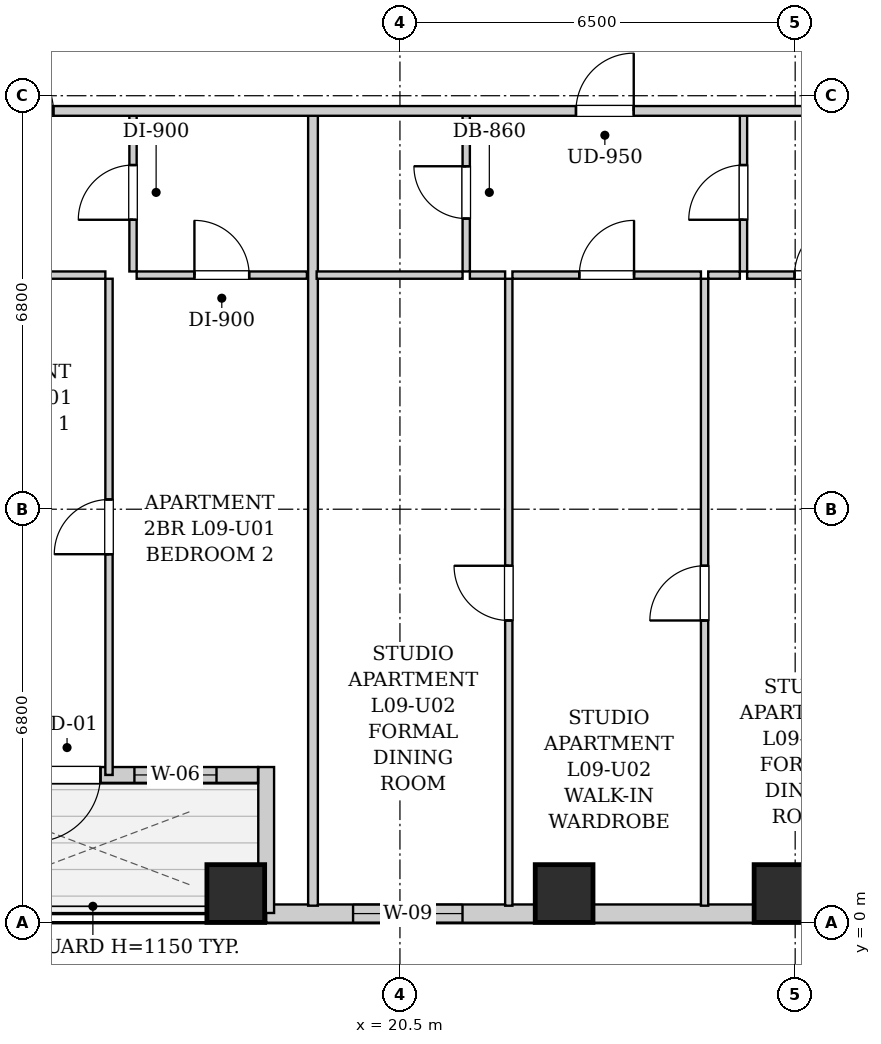
"""IFC4 building model, lengths in metres.
Left out: names, types, materials, properties, quantities, classifications, styles, units other than length and angle.
Written with IfcOpenShell. Run it as: python <this file> out.ifc"""

import sys

from ifc_helpers import new_model, si_unit, direction, frame, frame_2d, origin, origin_2d, place, context, subcontext, project, spatial, rectangle, extrude, element, fill, save


model = new_model("IFC4")
c1 = context("Model", 3, precision=1e-05, world=origin(), true_north=direction((0.0, 1.0)))
c2 = subcontext(c1, "Body", "Model", "MODEL_VIEW")
j1 = project(units=[si_unit("LENGTHUNIT", "METRE"), si_unit("PLANEANGLEUNIT", "RADIAN")], contexts=[c1])
p1 = place(None, origin())
s1 = spatial("IfcSite", under=j1, at=p1, CompositionType="ELEMENT")
p2 = place(p1, origin())
s2 = spatial("IfcBuilding", under=s1, at=p2, CompositionType="ELEMENT")
p3 = place(p2, frame((0.0, 0.0, 38.6)))
s3 = spatial("IfcBuildingStorey", under=s2, at=p3, CompositionType="ELEMENT", Elevation=38.6)
for number, where, z_axis, x_axis in (
    (1, (17.8, 0.48, 0.0), (0.0, 0.0, 1.0), (1.0, 0.0, 0.0)),
    (2, (23.2, 0.48, 0.0), (0.0, 0.0, 1.0), (1.0, 0.0, 0.0)),
    (3, (26.8, 0.48, 0.0), (0.0, 0.0, 1.0), (1.0, 0.0, 0.0)),
):
    element("IfcColumn", number, at=place(p3, frame(where, z_axis=z_axis, x_axis=x_axis)), inside=s3, PredefinedType="COLUMN", context=c2, shape_type="SweptSolid", body=[
        extrude(rectangle(XDim=0.95, YDim=0.95, at=origin_2d()), origin(), (0.0, 0.0, 1.0), 3.2),
    ])
p4 = place(p3, frame((44.0, 0.15, 0.0), z_axis=(0.0, 0.0, 1.0), x_axis=(-1.0, 0.0, 0.0)))
e4 = element("IfcWall", 4, at=p4, inside=s3, PredefinedType="SOLIDWALL", context=c2, shape_type="SweptSolid", body=[
    extrude(rectangle(XDim=25.7, YDim=0.3, at=frame_2d((12.85, 0.0))), origin(), (0.0, 0.0, 1.0), 1.975),
])
p5 = place(p4, frame((22.471, 0.0, 0.55)))
e5 = element("IfcOpeningElement", 5, at=p5, cuts=e4, PredefinedType="OPENING", context=c2, shape_type="SweptSolid", body=[
    extrude(rectangle(XDim=1.8, YDim=1.2, at=frame_2d((0.9, 0.6))), frame((0.0, 0.16, 0.0), z_axis=(0.0, -1.0, 0.0), x_axis=(1.0, 0.0, 0.0)), (0.0, 0.0, 1.0), 0.32),
])
p6 = place(p4, frame((15.65, 0.0, 0.55)))
e6 = element("IfcOpeningElement", 6, at=p6, cuts=e4, PredefinedType="OPENING", context=c2, shape_type="SweptSolid", body=[
    extrude(rectangle(XDim=0.85, YDim=1.2, at=frame_2d((0.425, 0.6))), frame((0.0, 0.16, 0.0), z_axis=(0.0, -1.0, 0.0), x_axis=(1.0, 0.0, 0.0)), (0.0, 0.0, 1.0), 0.32),
])
p7 = place(p4, frame((12.777, 0.0, 0.55)))
e7 = element("IfcOpeningElement", 7, at=p7, cuts=e4, PredefinedType="OPENING", context=c2, shape_type="SweptSolid", body=[
    extrude(rectangle(XDim=1.8, YDim=1.2, at=frame_2d((0.9, 0.6))), frame((0.0, 0.16, 0.0), z_axis=(0.0, -1.0, 0.0), x_axis=(1.0, 0.0, 0.0)), (0.0, 0.0, 1.0), 0.32),
])
p8 = place(p4, frame((9.315, 0.0, 0.55)))
e8 = element("IfcOpeningElement", 8, at=p8, cuts=e4, PredefinedType="OPENING", context=c2, shape_type="SweptSolid", body=[
    extrude(rectangle(XDim=0.85, YDim=1.2, at=frame_2d((0.425, 0.6))), frame((0.0, 0.16, 0.0), z_axis=(0.0, -1.0, 0.0), x_axis=(1.0, 0.0, 0.0)), (0.0, 0.0, 1.0), 0.32),
])
p9 = place(p4, frame((6.435, 0.0, 0.55)))
e9 = element("IfcOpeningElement", 9, at=p9, cuts=e4, PredefinedType="OPENING", context=c2, shape_type="SweptSolid", body=[
    extrude(rectangle(XDim=1.8, YDim=1.2, at=frame_2d((0.9, 0.6))), frame((0.0, 0.16, 0.0), z_axis=(0.0, -1.0, 0.0), x_axis=(1.0, 0.0, 0.0)), (0.0, 0.0, 1.0), 0.32),
])
p10 = place(p4, frame((2.106, 0.0, 0.55)))
e10 = element("IfcOpeningElement", 10, at=p10, cuts=e4, PredefinedType="OPENING", context=c2, shape_type="SweptSolid", body=[
    extrude(rectangle(XDim=1.8, YDim=1.2, at=frame_2d((0.9, 0.6))), frame((0.0, 0.16, 0.0), z_axis=(0.0, -1.0, 0.0), x_axis=(1.0, 0.0, 0.0)), (0.0, 0.0, 1.0), 0.32),
])
p11 = place(p3, frame((18.3, 0.16, 0.0), z_axis=(0.0, 0.0, 1.0), x_axis=(0.0, 1.0, 0.0)))
e11 = element("IfcWall", 11, at=p11, inside=s3, PredefinedType="SOLIDWALL", context=c2, shape_type="SweptSolid", body=[
    extrude(rectangle(XDim=2.4, YDim=0.26, at=frame_2d((1.2, 0.0))), origin(), (0.0, 0.0, 1.0), 2.94),
])
p12 = place(p3, frame((18.166, 2.43, 0.0), z_axis=(0.0, 0.0, 1.0), x_axis=(-1.0, 0.0, 0.0)))
e12 = element("IfcWall", 12, at=p12, inside=s3, PredefinedType="SOLIDWALL", context=c2, shape_type="SweptSolid", body=[
    extrude(rectangle(XDim=5.432, YDim=0.26, at=frame_2d((2.716, 0.0))), origin(), (0.0, 0.0, 1.0), 2.94),
])
p13 = place(p12, frame((2.591, 0.0, 0.0)))
e13 = element("IfcOpeningElement", 13, at=p13, cuts=e12, PredefinedType="OPENING", context=c2, shape_type="SweptSolid", body=[
    extrude(rectangle(XDim=1.1, YDim=2.0, at=frame_2d((0.55, 1.0))), frame((0.0, 0.14, 0.0), z_axis=(0.0, -1.0, 0.0), x_axis=(1.0, 0.0, 0.0)), (0.0, 0.0, 1.0), 0.28),
])
p14 = place(p12, frame((3.851, 0.0, 0.55)))
e14 = element("IfcOpeningElement", 14, at=p14, cuts=e12, PredefinedType="OPENING", context=c2, shape_type="SweptSolid", body=[
    extrude(rectangle(XDim=0.85, YDim=1.2, at=frame_2d((0.425, 0.6))), frame((0.0, 0.14, 0.0), z_axis=(0.0, -1.0, 0.0), x_axis=(1.0, 0.0, 0.0)), (0.0, 0.0, 1.0), 0.28),
])
p15 = place(p12, frame((0.683, 0.0, 0.85)))
e15 = element("IfcOpeningElement", 15, at=p15, cuts=e12, PredefinedType="OPENING", context=c2, shape_type="SweptSolid", body=[
    extrude(rectangle(XDim=1.35, YDim=1.65, at=frame_2d((0.675, 0.825))), frame((0.0, 0.14, 0.0), z_axis=(0.0, -1.0, 0.0), x_axis=(1.0, 0.0, 0.0)), (0.0, 0.0, 1.0), 0.28),
])
p16 = place(p3, frame((16.11, 10.71, 0.0), z_axis=(0.0, 0.0, 1.0), x_axis=(0.0, 1.0, 0.0)))
e16 = element("IfcWall", 16, at=p16, inside=s3, PredefinedType="PARTITIONING", context=c2, shape_type="SweptSolid", body=[
    extrude(rectangle(XDim=2.6, YDim=0.12, at=frame_2d((1.3, 0.0))), origin(), (0.0, 0.0, 1.0), 2.94),
])
p17 = place(p16, frame((0.85, 0.0, 0.0)))
e17 = element("IfcOpeningElement", 17, at=p17, cuts=e16, PredefinedType="OPENING", context=c2, shape_type="SweptSolid", body=[
    extrude(rectangle(XDim=0.9, YDim=2.05, at=frame_2d((0.45, 1.025))), frame((0.0, 0.07, 0.0), z_axis=(0.0, -1.0, 0.0), x_axis=(1.0, 0.0, 0.0)), (0.0, 0.0, 1.0), 0.14),
])
p18 = place(p3, frame((12.6, 10.65, 0.0), z_axis=(0.0, 0.0, 1.0), x_axis=(1.0, 0.0, 0.0)))
e18 = element("IfcWall", 18, at=p18, inside=s3, PredefinedType="PARTITIONING", context=c2, shape_type="SweptSolid", body=[
    extrude(rectangle(XDim=3.055, YDim=0.12, at=frame_2d((1.527, 0.0))), origin(), (0.0, 0.0, 1.0), 2.94),
])
p19 = place(p18, frame((1.077, 0.0, 0.0)))
e19 = element("IfcOpeningElement", 19, at=p19, cuts=e18, PredefinedType="OPENING", context=c2, shape_type="SweptSolid", body=[
    extrude(rectangle(XDim=0.9, YDim=2.05, at=frame_2d((0.45, 1.025))), frame((0.0, 0.07, 0.0), z_axis=(0.0, -1.0, 0.0), x_axis=(1.0, 0.0, 0.0)), (0.0, 0.0, 1.0), 0.14),
])
p20 = place(p3, frame((16.17, 10.65, 0.0), z_axis=(0.0, 0.0, 1.0), x_axis=(1.0, 0.0, 0.0)))
e20 = element("IfcWall", 20, at=p20, inside=s3, PredefinedType="PARTITIONING", context=c2, shape_type="SweptSolid", body=[
    extrude(rectangle(XDim=2.8, YDim=0.12, at=frame_2d((1.4, 0.0))), origin(), (0.0, 0.0, 1.0), 2.94),
])
p21 = place(p20, frame((0.95, 0.0, 0.0)))
e21 = element("IfcOpeningElement", 21, at=p21, cuts=e20, PredefinedType="OPENING", context=c2, shape_type="SweptSolid", body=[
    extrude(rectangle(XDim=0.9, YDim=2.05, at=frame_2d((0.45, 1.025))), frame((0.0, 0.07, 0.0), z_axis=(0.0, -1.0, 0.0), x_axis=(1.0, 0.0, 0.0)), (0.0, 0.0, 1.0), 0.14),
])
p22 = place(p3, frame((15.715, 2.43, 0.0), z_axis=(0.0, 0.0, 1.0), x_axis=(0.0, 1.0, 0.0)))
e22 = element("IfcWall", 22, at=p22, inside=s3, PredefinedType="PARTITIONING", context=c2, shape_type="SweptSolid", body=[
    extrude(rectangle(XDim=8.16, YDim=0.12, at=frame_2d((4.08, 0.0))), origin(), (0.0, 0.0, 1.0), 2.94),
])
p23 = place(p22, frame((3.63, 0.0, 0.0)))
e23 = element("IfcOpeningElement", 23, at=p23, cuts=e22, PredefinedType="OPENING", context=c2, shape_type="SweptSolid", body=[
    extrude(rectangle(XDim=0.9, YDim=2.05, at=frame_2d((0.45, 1.025))), frame((0.0, 0.07, 0.0), z_axis=(0.0, -1.0, 0.0), x_axis=(1.0, 0.0, 0.0)), (0.0, 0.0, 1.0), 0.14),
])
p24 = place(p3, frame((19.07, 0.28, 0.0), z_axis=(0.0, 0.0, 1.0), x_axis=(0.0, 1.0, 0.0)))
e24 = element("IfcWall", 24, at=p24, inside=s3, PredefinedType="PARTITIONING", context=c2, shape_type="SweptSolid", body=[
    extrude(rectangle(XDim=13.03, YDim=0.16, at=frame_2d((6.515, 0.0))), origin(), (0.0, 0.0, 1.0), 2.94),
])
p25 = place(p3, frame((21.59, 10.71, 0.0), z_axis=(0.0, 0.0, 1.0), x_axis=(0.0, 1.0, 0.0)))
e25 = element("IfcWall", 25, at=p25, inside=s3, PredefinedType="PARTITIONING", context=c2, shape_type="SweptSolid", body=[
    extrude(rectangle(XDim=2.6, YDim=0.12, at=frame_2d((1.3, 0.0))), origin(), (0.0, 0.0, 1.0), 2.94),
])
p26 = place(p25, frame((0.87, 0.0, 0.0)))
e26 = element("IfcOpeningElement", 26, at=p26, cuts=e25, PredefinedType="OPENING", context=c2, shape_type="SweptSolid", body=[
    extrude(rectangle(XDim=0.86, YDim=2.05, at=frame_2d((0.43, 1.025))), frame((0.0, 0.07, 0.0), z_axis=(0.0, -1.0, 0.0), x_axis=(1.0, 0.0, 0.0)), (0.0, 0.0, 1.0), 0.14),
])
p27 = place(p3, frame((19.13, 10.65, 0.0), z_axis=(0.0, 0.0, 1.0), x_axis=(1.0, 0.0, 0.0)))
e27 = element("IfcWall", 27, at=p27, inside=s3, PredefinedType="PARTITIONING", context=c2, shape_type="SweptSolid", body=[
    extrude(rectangle(XDim=2.4, YDim=0.12, at=frame_2d((1.2, 0.0))), origin(), (0.0, 0.0, 1.0), 2.94),
])
p28 = place(p3, frame((26.15, 10.71, 0.0), z_axis=(0.0, 0.0, 1.0), x_axis=(0.0, 1.0, 0.0)))
e28 = element("IfcWall", 28, at=p28, inside=s3, PredefinedType="PARTITIONING", context=c2, shape_type="SweptSolid", body=[
    extrude(rectangle(XDim=2.6, YDim=0.12, at=frame_2d((1.3, 0.0))), origin(), (0.0, 0.0, 1.0), 2.94),
])
p29 = place(p28, frame((0.85, 0.0, 0.0)))
e29 = element("IfcOpeningElement", 29, at=p29, cuts=e28, PredefinedType="OPENING", context=c2, shape_type="SweptSolid", body=[
    extrude(rectangle(XDim=0.9, YDim=2.05, at=frame_2d((0.45, 1.025))), frame((0.0, 0.07, 0.0), z_axis=(0.0, -1.0, 0.0), x_axis=(1.0, 0.0, 0.0)), (0.0, 0.0, 1.0), 0.14),
])
p30 = place(p3, frame((21.65, 10.65, 0.0), z_axis=(0.0, 0.0, 1.0), x_axis=(1.0, 0.0, 0.0)))
e30 = element("IfcWall", 30, at=p30, inside=s3, PredefinedType="PARTITIONING", context=c2, shape_type="SweptSolid", body=[
    extrude(rectangle(XDim=0.58, YDim=0.12, at=frame_2d((0.29, 0.0))), origin(), (0.0, 0.0, 1.0), 2.94),
])
p31 = place(p3, frame((22.35, 10.65, 0.0), z_axis=(0.0, 0.0, 1.0), x_axis=(1.0, 0.0, 0.0)))
e31 = element("IfcWall", 31, at=p31, inside=s3, PredefinedType="PARTITIONING", context=c2, shape_type="SweptSolid", body=[
    extrude(rectangle(XDim=3.1, YDim=0.12, at=frame_2d((1.55, 0.0))), origin(), (0.0, 0.0, 1.0), 2.94),
])
p32 = place(p31, frame((1.1, 0.0, 0.0)))
e32 = element("IfcOpeningElement", 32, at=p32, cuts=e31, PredefinedType="OPENING", context=c2, shape_type="SweptSolid", body=[
    extrude(rectangle(XDim=0.9, YDim=2.05, at=frame_2d((0.45, 1.025))), frame((0.0, 0.07, 0.0), z_axis=(0.0, -1.0, 0.0), x_axis=(1.0, 0.0, 0.0)), (0.0, 0.0, 1.0), 0.14),
])
p33 = place(p3, frame((25.57, 10.65, 0.0), z_axis=(0.0, 0.0, 1.0), x_axis=(1.0, 0.0, 0.0)))
e33 = element("IfcWall", 33, at=p33, inside=s3, PredefinedType="PARTITIONING", context=c2, shape_type="SweptSolid", body=[
    extrude(rectangle(XDim=0.52, YDim=0.12, at=frame_2d((0.26, 0.0))), origin(), (0.0, 0.0, 1.0), 2.94),
])
p34 = place(p3, frame((26.21, 10.65, 0.0), z_axis=(0.0, 0.0, 1.0), x_axis=(1.0, 0.0, 0.0)))
e34 = element("IfcWall", 34, at=p34, inside=s3, PredefinedType="PARTITIONING", context=c2, shape_type="SweptSolid", body=[
    extrude(rectangle(XDim=2.46, YDim=0.12, at=frame_2d((1.23, 0.0))), origin(), (0.0, 0.0, 1.0), 2.94),
])
p35 = place(p34, frame((0.78, 0.0, 0.0)))
e35 = element("IfcOpeningElement", 35, at=p35, cuts=e34, PredefinedType="OPENING", context=c2, shape_type="SweptSolid", body=[
    extrude(rectangle(XDim=0.9, YDim=2.05, at=frame_2d((0.45, 1.025))), frame((0.0, 0.07, 0.0), z_axis=(0.0, -1.0, 0.0), x_axis=(1.0, 0.0, 0.0)), (0.0, 0.0, 1.0), 0.14),
])
p36 = place(p3, frame((22.29, 0.28, 0.0), z_axis=(0.0, 0.0, 1.0), x_axis=(0.0, 1.0, 0.0)))
e36 = element("IfcWall", 36, at=p36, inside=s3, PredefinedType="PARTITIONING", context=c2, shape_type="SweptSolid", body=[
    extrude(rectangle(XDim=10.31, YDim=0.12, at=frame_2d((5.155, 0.0))), origin(), (0.0, 0.0, 1.0), 2.94),
])
p37 = place(p36, frame((4.69, 0.0, 0.0)))
e37 = element("IfcOpeningElement", 37, at=p37, cuts=e36, PredefinedType="OPENING", context=c2, shape_type="SweptSolid", body=[
    extrude(rectangle(XDim=0.9, YDim=2.05, at=frame_2d((0.45, 1.025))), frame((0.0, 0.07, 0.0), z_axis=(0.0, -1.0, 0.0), x_axis=(1.0, 0.0, 0.0)), (0.0, 0.0, 1.0), 0.14),
])
p38 = place(p3, frame((25.51, 0.28, 0.0), z_axis=(0.0, 0.0, 1.0), x_axis=(0.0, 1.0, 0.0)))
e38 = element("IfcWall", 38, at=p38, inside=s3, PredefinedType="PARTITIONING", context=c2, shape_type="SweptSolid", body=[
    extrude(rectangle(XDim=10.31, YDim=0.12, at=frame_2d((5.155, 0.0))), origin(), (0.0, 0.0, 1.0), 2.94),
])
p39 = place(p38, frame((4.69, 0.0, 0.0)))
e39 = element("IfcOpeningElement", 39, at=p39, cuts=e38, PredefinedType="OPENING", context=c2, shape_type="SweptSolid", body=[
    extrude(rectangle(XDim=0.9, YDim=2.05, at=frame_2d((0.45, 1.025))), frame((0.0, 0.07, 0.0), z_axis=(0.0, -1.0, 0.0), x_axis=(1.0, 0.0, 0.0)), (0.0, 0.0, 1.0), 0.14),
])
p40 = place(p3, frame((10.05, 13.35, 0.0), z_axis=(0.0, 0.0, 1.0), x_axis=(1.0, 0.0, 0.0)))
e40 = element("IfcWall", 40, at=p40, inside=s3, PredefinedType="PARTITIONING", context=c2, shape_type="SweptSolid", body=[
    extrude(rectangle(XDim=33.9, YDim=0.16, at=frame_2d((16.95, 0.0))), origin(), (0.0, 0.0, 1.0), 2.94),
])
p41 = place(p40, frame((3.8, 0.0, 0.0)))
e41 = element("IfcOpeningElement", 41, at=p41, cuts=e40, PredefinedType="OPENING", context=c2, shape_type="SweptSolid", body=[
    extrude(rectangle(XDim=0.95, YDim=2.1, at=frame_2d((0.475, 1.05))), frame((0.0, 0.09, 0.0), z_axis=(0.0, -1.0, 0.0), x_axis=(1.0, 0.0, 0.0)), (0.0, 0.0, 1.0), 0.18),
])
p42 = place(p40, frame((13.345, 0.0, 0.0)))
e42 = element("IfcOpeningElement", 42, at=p42, cuts=e40, PredefinedType="OPENING", context=c2, shape_type="SweptSolid", body=[
    extrude(rectangle(XDim=0.95, YDim=2.1, at=frame_2d((0.475, 1.05))), frame((0.0, 0.09, 0.0), z_axis=(0.0, -1.0, 0.0), x_axis=(1.0, 0.0, 0.0)), (0.0, 0.0, 1.0), 0.18),
])
p43 = place(p17, origin())
e43 = element("IfcDoor", 43, at=p43, inside=s3, OperationType="SINGLE_SWING_LEFT", PredefinedType="DOOR", context=c2, shape_type="SweptSolid", body=[
    extrude(rectangle(XDim=0.9, YDim=2.05, at=frame_2d((0.45, 1.025))), frame((0.0, 0.025, 0.0), z_axis=(0.0, -1.0, 0.0), x_axis=(1.0, 0.0, 0.0)), (0.0, 0.0, 1.0), 0.05),
])
fill(e17, e43)
p44 = place(p21, origin())
e44 = element("IfcDoor", 44, at=p44, inside=s3, OperationType="SINGLE_SWING_LEFT", PredefinedType="DOOR", context=c2, shape_type="SweptSolid", body=[
    extrude(rectangle(XDim=0.9, YDim=2.05, at=frame_2d((0.45, 1.025))), frame((0.0, 0.025, 0.0), z_axis=(0.0, -1.0, 0.0), x_axis=(1.0, 0.0, 0.0)), (0.0, 0.0, 1.0), 0.05),
])
fill(e21, e44)
p45 = place(p23, origin())
e45 = element("IfcDoor", 45, at=p45, inside=s3, OperationType="SINGLE_SWING_LEFT", PredefinedType="DOOR", context=c2, shape_type="SweptSolid", body=[
    extrude(rectangle(XDim=0.9, YDim=2.05, at=frame_2d((0.45, 1.025))), frame((0.0, 0.025, 0.0), z_axis=(0.0, -1.0, 0.0), x_axis=(1.0, 0.0, 0.0)), (0.0, 0.0, 1.0), 0.05),
])
fill(e23, e45)
p46 = place(p26, origin())
e46 = element("IfcDoor", 46, at=p46, inside=s3, OperationType="SINGLE_SWING_RIGHT", PredefinedType="DOOR", context=c2, shape_type="SweptSolid", body=[
    extrude(rectangle(XDim=0.86, YDim=2.05, at=frame_2d((0.43, 1.025))), frame((0.0, 0.025, 0.0), z_axis=(0.0, -1.0, 0.0), x_axis=(1.0, 0.0, 0.0)), (0.0, 0.0, 1.0), 0.05),
])
fill(e26, e46)
p47 = place(p29, origin())
e47 = element("IfcDoor", 47, at=p47, inside=s3, OperationType="SINGLE_SWING_LEFT", PredefinedType="DOOR", context=c2, shape_type="SweptSolid", body=[
    extrude(rectangle(XDim=0.9, YDim=2.05, at=frame_2d((0.45, 1.025))), frame((0.0, 0.025, 0.0), z_axis=(0.0, -1.0, 0.0), x_axis=(1.0, 0.0, 0.0)), (0.0, 0.0, 1.0), 0.05),
])
fill(e29, e47)
p48 = place(p32, origin())
e48 = element("IfcDoor", 48, at=p48, inside=s3, OperationType="SINGLE_SWING_RIGHT", PredefinedType="DOOR", context=c2, shape_type="SweptSolid", body=[
    extrude(rectangle(XDim=0.9, YDim=2.05, at=frame_2d((0.45, 1.025))), frame((0.0, 0.025, 0.0), z_axis=(0.0, -1.0, 0.0), x_axis=(1.0, 0.0, 0.0)), (0.0, 0.0, 1.0), 0.05),
])
fill(e32, e48)
p49 = place(p35, origin())
e49 = element("IfcDoor", 49, at=p49, inside=s3, OperationType="SINGLE_SWING_RIGHT", PredefinedType="DOOR", context=c2, shape_type="SweptSolid", body=[
    extrude(rectangle(XDim=0.9, YDim=2.05, at=frame_2d((0.45, 1.025))), frame((0.0, 0.025, 0.0), z_axis=(0.0, -1.0, 0.0), x_axis=(1.0, 0.0, 0.0)), (0.0, 0.0, 1.0), 0.05),
])
fill(e35, e49)
p50 = place(p37, origin())
e50 = element("IfcDoor", 50, at=p50, inside=s3, OperationType="SINGLE_SWING_RIGHT", PredefinedType="DOOR", context=c2, shape_type="SweptSolid", body=[
    extrude(rectangle(XDim=0.9, YDim=2.05, at=frame_2d((0.45, 1.025))), frame((0.0, 0.025, 0.0), z_axis=(0.0, -1.0, 0.0), x_axis=(1.0, 0.0, 0.0)), (0.0, 0.0, 1.0), 0.05),
])
fill(e37, e50)
p51 = place(p39, origin())
e51 = element("IfcDoor", 51, at=p51, inside=s3, OperationType="SINGLE_SWING_LEFT", PredefinedType="DOOR", context=c2, shape_type="SweptSolid", body=[
    extrude(rectangle(XDim=0.9, YDim=2.05, at=frame_2d((0.45, 1.025))), frame((0.0, 0.025, 0.0), z_axis=(0.0, -1.0, 0.0), x_axis=(1.0, 0.0, 0.0)), (0.0, 0.0, 1.0), 0.05),
])
fill(e39, e51)
p52 = place(p41, origin())
e52 = element("IfcDoor", 52, at=p52, inside=s3, OperationType="SINGLE_SWING_LEFT", PredefinedType="DOOR", context=c2, shape_type="SweptSolid", body=[
    extrude(rectangle(XDim=0.95, YDim=2.1, at=frame_2d((0.475, 1.05))), frame((0.0, 0.025, 0.0), z_axis=(0.0, -1.0, 0.0), x_axis=(1.0, 0.0, 0.0)), (0.0, 0.0, 1.0), 0.05),
])
fill(e41, e52)
p53 = place(p42, origin())
e53 = element("IfcDoor", 53, at=p53, inside=s3, OperationType="SINGLE_SWING_RIGHT", PredefinedType="DOOR", context=c2, shape_type="SweptSolid", body=[
    extrude(rectangle(XDim=0.95, YDim=2.1, at=frame_2d((0.475, 1.05))), frame((0.0, 0.025, 0.0), z_axis=(0.0, -1.0, 0.0), x_axis=(1.0, 0.0, 0.0)), (0.0, 0.0, 1.0), 0.05),
])
fill(e42, e53)
p54 = place(p13, origin())
e54 = element("IfcDoor", 54, at=p54, inside=s3, OperationType="SINGLE_SWING_RIGHT", PredefinedType="DOOR", context=c2, shape_type="SweptSolid", body=[
    extrude(rectangle(XDim=1.1, YDim=2.0, at=frame_2d((0.55, 1.0))), frame((0.0, 0.025, 0.0), z_axis=(0.0, -1.0, 0.0), x_axis=(1.0, 0.0, 0.0)), (0.0, 0.0, 1.0), 0.05),
])
fill(e13, e54)
p55 = place(p15, origin())
e55 = element("IfcWindow", 55, at=p55, inside=s3, PartitioningType="SINGLE_PANEL", PredefinedType="WINDOW", context=c2, shape_type="SweptSolid", body=[
    extrude(rectangle(XDim=1.35, YDim=1.65, at=frame_2d((0.675, 0.825))), frame((0.0, 0.03, 0.0), z_axis=(0.0, -1.0, 0.0), x_axis=(1.0, 0.0, 0.0)), (0.0, 0.0, 1.0), 0.06),
])
fill(e15, e55)
p56 = place(p5, origin())
e56 = element("IfcWindow", 56, at=p56, inside=s3, PartitioningType="DOUBLE_PANEL_VERTICAL", PredefinedType="WINDOW", context=c2, shape_type="SweptSolid", body=[
    extrude(rectangle(XDim=1.8, YDim=1.2, at=frame_2d((0.9, 0.6))), frame((0.0, 0.03, 0.0), z_axis=(0.0, -1.0, 0.0), x_axis=(1.0, 0.0, 0.0)), (0.0, 0.0, 1.0), 0.06),
])
fill(e5, e56)
save(model, sys.argv[1])
